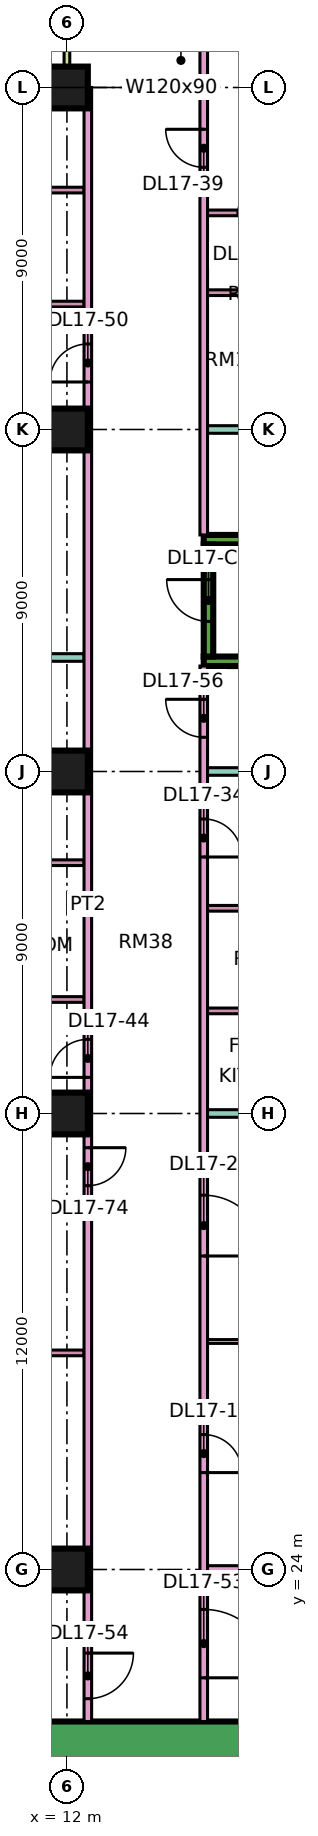
"""IFC4 building model, lengths in metres.
Left out: names, types, materials, properties, quantities, classifications, styles, units other than length and angle.
Written with IfcOpenShell. Run it as: python <this file> out.ifc"""

import sys

from ifc_helpers import new_model, si_unit, direction, frame, frame_2d, origin, origin_2d, place, context, subcontext, project, spatial, rectangle, extrude, element, fill, save


model = new_model("IFC4")
c1 = context("Model", 3, precision=1e-05, world=origin(), true_north=direction((0.0, 1.0)))
c2 = subcontext(c1, "Body", "Model", "MODEL_VIEW")
j1 = project(units=[si_unit("LENGTHUNIT", "METRE"), si_unit("PLANEANGLEUNIT", "RADIAN")], contexts=[c1])
p1 = place(None, origin())
s1 = spatial("IfcSite", under=j1, at=p1, CompositionType="ELEMENT")
p2 = place(p1, origin())
s2 = spatial("IfcBuilding", under=s1, at=p2, CompositionType="ELEMENT")
p3 = place(p2, frame((0.0, 0.0, 78.9)))
s3 = spatial("IfcBuildingStorey", under=s2, at=p3, CompositionType="ELEMENT", Elevation=78.9)
for number, where, z_axis, x_axis in (
    (1, (12.0, 24.0, 0.0), (0.0, 0.0, 1.0), (1.0, 0.0, 0.0)),
    (2, (12.0, 36.0, 0.0), (0.0, 0.0, 1.0), (1.0, 0.0, 0.0)),
    (3, (12.0, 45.0, 0.0), (0.0, 0.0, 1.0), (1.0, 0.0, 0.0)),
    (4, (12.0, 54.0, 0.0), (0.0, 0.0, 1.0), (1.0, 0.0, 0.0)),
    (5, (12.0, 63.0, 0.0), (0.0, 0.0, 1.0), (1.0, 0.0, 0.0)),
):
    element("IfcColumn", number, at=place(p3, frame(where, z_axis=z_axis, x_axis=x_axis)), inside=s3, PredefinedType="COLUMN", context=c2, shape_type="SweptSolid", body=[
        extrude(rectangle(XDim=1.1, YDim=1.1, at=origin_2d()), origin(), (0.0, 0.0, 1.0), 3.75),
    ])
p4 = place(p3, frame((9.0, 19.45, 0.0), z_axis=(0.0, 0.0, 1.0), x_axis=(1.0, 0.0, 0.0)))
e6 = element("IfcWall", 6, at=p4, inside=s3, PredefinedType="SHEAR", context=c2, shape_type="SweptSolid", body=[
    extrude(rectangle(XDim=25.0, YDim=1.1, at=frame_2d((12.5, 0.0))), origin(), (0.0, 0.0, 1.0), 3.75),
])
p5 = place(p4, frame((19.1, 0.0, 0.0)))
e7 = element("IfcOpeningElement", 7, at=p5, cuts=e6, PredefinedType="OPENING", context=c2, shape_type="SweptSolid", body=[
    extrude(rectangle(XDim=1.8, YDim=2.4, at=frame_2d((0.9, 1.2))), frame((0.0, 0.56, 0.0), z_axis=(0.0, -1.0, 0.0), x_axis=(1.0, 0.0, 0.0)), (0.0, 0.0, 1.0), 1.12),
])
for number, where, z_axis, x_axis in (
    (8, (15.6, 47.9, 0.0), (0.0, 0.0, 1.0), (1.0, 0.0, 0.0)),
    (9, (15.6, 51.1, 0.0), (0.0, 0.0, 1.0), (1.0, 0.0, 0.0)),
):
    element("IfcWall", number, at=place(p3, frame(where, z_axis=z_axis, x_axis=x_axis)), inside=s3, PredefinedType="SHEAR", context=c2, shape_type="SweptSolid", body=[
        extrude(rectangle(XDim=7.0, YDim=0.25, at=frame_2d((3.5, 0.0))), origin(), (0.0, 0.0, 1.0), 3.75),
    ])
p6 = place(p3, frame((15.725, 48.025, 0.0), z_axis=(0.0, 0.0, 1.0), x_axis=(0.0, 1.0, 0.0)))
e10 = element("IfcWall", 10, at=p6, inside=s3, PredefinedType="SHEAR", context=c2, shape_type="SweptSolid", body=[
    extrude(rectangle(XDim=2.95, YDim=0.25, at=frame_2d((1.475, 0.0))), origin(), (0.0, 0.0, 1.0), 3.75),
])
p7 = place(p6, frame((0.925, 0.0, 0.0)))
e11 = element("IfcOpeningElement", 11, at=p7, cuts=e10, PredefinedType="OPENING", context=c2, shape_type="SweptSolid", body=[
    extrude(rectangle(XDim=1.1, YDim=2.2, at=frame_2d((0.55, 1.1))), frame((0.0, 0.135, 0.0), z_axis=(0.0, -1.0, 0.0), x_axis=(1.0, 0.0, 0.0)), (0.0, 0.0, 1.0), 0.27),
])
p8 = place(p3, frame((11.925, 63.0, 0.0), z_axis=(0.0, 0.0, 1.0), x_axis=(-1.0, 0.0, 0.0)))
e12 = element("IfcWall", 12, at=p8, inside=s3, PredefinedType="SOLIDWALL", context=c2, shape_type="SweptSolid", body=[
    extrude(rectangle(XDim=10.35, YDim=0.15, at=frame_2d((5.175, 0.0))), origin(), (0.0, 0.0, 1.0), 3.35),
])
p9 = place(p8, frame((1.775, 0.0, 1.7)))
e13 = element("IfcOpeningElement", 13, at=p9, cuts=e12, PredefinedType="OPENING", context=c2, shape_type="SweptSolid", body=[
    extrude(rectangle(XDim=1.2, YDim=0.9, at=frame_2d((0.6, 0.45))), frame((0.0, 0.085, 0.0), z_axis=(0.0, -1.0, 0.0), x_axis=(1.0, 0.0, 0.0)), (0.0, 0.0, 1.0), 0.17),
])
p10 = place(p8, frame((6.962, 0.0, 0.0)))
e14 = element("IfcOpeningElement", 14, at=p10, cuts=e12, PredefinedType="OPENING", context=c2, shape_type="SweptSolid", body=[
    extrude(rectangle(XDim=1.8, YDim=2.4, at=frame_2d((0.9, 1.2))), frame((0.0, 0.085, 0.0), z_axis=(0.0, -1.0, 0.0), x_axis=(1.0, 0.0, 0.0)), (0.0, 0.0, 1.0), 0.17),
])
p11 = place(p3, frame((12.0, 64.5, 0.0), z_axis=(0.0, 0.0, 1.0), x_axis=(0.0, -1.0, 0.0)))
e15 = element("IfcWall", 15, at=p11, inside=s3, PredefinedType="SOLIDWALL", context=c2, shape_type="SweptSolid", body=[
    extrude(rectangle(XDim=1.5, YDim=0.15, at=frame_2d((0.75, 0.0))), origin(), (0.0, 0.0, 1.0), 3.35),
])
p12 = place(p3, frame((-1.35, 22.4, 0.0), z_axis=(0.0, 0.0, 1.0), x_axis=(1.0, 0.0, 0.0)))
e16 = element("IfcWall", 16, at=p12, inside=s3, PredefinedType="PARTITIONING", context=c2, shape_type="SweptSolid", body=[
    extrude(rectangle(XDim=13.8, YDim=0.2, at=frame_2d((6.9, 0.0))), origin(), (0.0, 0.0, 1.0), 3.35),
])
p13 = place(p3, frame((0.0, 36.0, 0.0), z_axis=(0.0, 0.0, 1.0), x_axis=(1.0, 0.0, 0.0)))
e17 = element("IfcWall", 17, at=p13, inside=s3, PredefinedType="PARTITIONING", context=c2, shape_type="SweptSolid", body=[
    extrude(rectangle(XDim=12.45, YDim=0.2, at=frame_2d((6.225, 0.0))), origin(), (0.0, 0.0, 1.0), 3.35),
])
p14 = place(p3, frame((0.0, 48.0, 0.0), z_axis=(0.0, 0.0, 1.0), x_axis=(1.0, 0.0, 0.0)))
e18 = element("IfcWall", 18, at=p14, inside=s3, PredefinedType="PARTITIONING", context=c2, shape_type="SweptSolid", body=[
    extrude(rectangle(XDim=12.45, YDim=0.2, at=frame_2d((6.225, 0.0))), origin(), (0.0, 0.0, 1.0), 3.35),
])
for number, where, z_axis, x_axis in (
    (19, (7.225, 29.7, 0.0), (0.0, 0.0, 1.0), (1.0, 0.0, 0.0)),
    (20, (7.225, 33.3, 0.0), (0.0, 0.0, 1.0), (1.0, 0.0, 0.0)),
):
    element("IfcWall", number, at=place(p3, frame(where, z_axis=z_axis, x_axis=x_axis)), inside=s3, PredefinedType="PARTITIONING", context=c2, shape_type="SweptSolid", body=[
        extrude(rectangle(XDim=5.225, YDim=0.15, at=frame_2d((2.612, 0.0))), origin(), (0.0, 0.0, 1.0), 3.35),
    ])
p15 = place(p3, frame((7.8, 54.3, 0.0), z_axis=(0.0, 0.0, 1.0), x_axis=(1.0, 0.0, 0.0)))
e21 = element("IfcWall", 21, at=p15, inside=s3, PredefinedType="PARTITIONING", context=c2, shape_type="SweptSolid", body=[
    extrude(rectangle(XDim=4.65, YDim=0.1, at=frame_2d((2.325, 0.0))), origin(), (0.0, 0.0, 1.0), 3.35),
])
for number, where, z_axis, x_axis in (
    (22, (7.825, 57.3, 0.0), (0.0, 0.0, 1.0), (1.0, 0.0, 0.0)),
    (23, (7.825, 60.3, 0.0), (0.0, 0.0, 1.0), (1.0, 0.0, 0.0)),
):
    element("IfcWall", number, at=place(p3, frame(where, z_axis=z_axis, x_axis=x_axis)), inside=s3, PredefinedType="PARTITIONING", context=c2, shape_type="SweptSolid", body=[
        extrude(rectangle(XDim=4.625, YDim=0.15, at=frame_2d((2.312, 0.0))), origin(), (0.0, 0.0, 1.0), 3.35),
    ])
p16 = place(p3, frame((8.425, 39.0, 0.0), z_axis=(0.0, 0.0, 1.0), x_axis=(1.0, 0.0, 0.0)))
e24 = element("IfcWall", 24, at=p16, inside=s3, PredefinedType="PARTITIONING", context=c2, shape_type="SweptSolid", body=[
    extrude(rectangle(XDim=4.025, YDim=0.15, at=frame_2d((2.012, 0.0))), origin(), (0.0, 0.0, 1.0), 3.35),
])
p17 = place(p16, frame((1.675, 0.0, 0.0)))
e25 = element("IfcOpeningElement", 25, at=p17, cuts=e24, PredefinedType="OPENING", context=c2, shape_type="SweptSolid", body=[
    extrude(rectangle(XDim=0.8, YDim=2.1, at=frame_2d((0.4, 1.05))), frame((0.0, 0.085, 0.0), z_axis=(0.0, -1.0, 0.0), x_axis=(1.0, 0.0, 0.0)), (0.0, 0.0, 1.0), 0.17),
])
p18 = place(p3, frame((8.425, 42.6, 0.0), z_axis=(0.0, 0.0, 1.0), x_axis=(1.0, 0.0, 0.0)))
e26 = element("IfcWall", 26, at=p18, inside=s3, PredefinedType="PARTITIONING", context=c2, shape_type="SweptSolid", body=[
    extrude(rectangle(XDim=4.025, YDim=0.15, at=frame_2d((2.012, 0.0))), origin(), (0.0, 0.0, 1.0), 3.35),
])
p19 = place(p3, frame((12.55, 20.0, 0.0), z_axis=(0.0, 0.0, 1.0), x_axis=(0.0, 1.0, 0.0)))
e27 = element("IfcWall", 27, at=p19, inside=s3, PredefinedType="PARTITIONING", context=c2, shape_type="SweptSolid", body=[
    extrude(rectangle(XDim=43.0, YDim=0.2, at=frame_2d((21.5, 0.0))), origin(), (0.0, 0.0, 1.0), 3.35),
])
p20 = place(p19, frame((16.95, 0.0, 0.0)))
e28 = element("IfcOpeningElement", 28, at=p20, cuts=e27, PredefinedType="OPENING", context=c2, shape_type="SweptSolid", body=[
    extrude(rectangle(XDim=1.0, YDim=2.1, at=frame_2d((0.5, 1.05))), frame((0.0, 0.11, 0.0), z_axis=(0.0, -1.0, 0.0), x_axis=(1.0, 0.0, 0.0)), (0.0, 0.0, 1.0), 0.22),
])
p21 = place(p19, frame((35.25, 0.0, 0.0)))
e29 = element("IfcOpeningElement", 29, at=p21, cuts=e27, PredefinedType="OPENING", context=c2, shape_type="SweptSolid", body=[
    extrude(rectangle(XDim=1.0, YDim=2.1, at=frame_2d((0.5, 1.05))), frame((0.0, 0.11, 0.0), z_axis=(0.0, -1.0, 0.0), x_axis=(1.0, 0.0, 0.0)), (0.0, 0.0, 1.0), 0.22),
])
p22 = place(p19, frame((0.6, 0.0, 0.0)))
e30 = element("IfcOpeningElement", 30, at=p22, cuts=e27, PredefinedType="OPENING", context=c2, shape_type="SweptSolid", body=[
    extrude(rectangle(XDim=1.2, YDim=2.1, at=frame_2d((0.6, 1.05))), frame((0.0, 0.11, 0.0), z_axis=(0.0, -1.0, 0.0), x_axis=(1.0, 0.0, 0.0)), (0.0, 0.0, 1.0), 0.22),
])
p23 = place(p19, frame((14.1, 0.0, 0.0)))
e31 = element("IfcOpeningElement", 31, at=p23, cuts=e27, PredefinedType="OPENING", context=c2, shape_type="SweptSolid", body=[
    extrude(rectangle(XDim=1.0, YDim=2.1, at=frame_2d((0.5, 1.05))), frame((0.0, 0.11, 0.0), z_axis=(0.0, -1.0, 0.0), x_axis=(1.0, 0.0, 0.0)), (0.0, 0.0, 1.0), 0.22),
])
p24 = place(p3, frame((15.6, 20.0, 0.0), z_axis=(0.0, 0.0, 1.0), x_axis=(0.0, 1.0, 0.0)))
e32 = element("IfcWall", 32, at=p24, inside=s3, PredefinedType="PARTITIONING", context=c2, shape_type="SweptSolid", body=[
    extrude(rectangle(XDim=27.775, YDim=0.2, at=frame_2d((13.887, 0.0))), origin(), (0.0, 0.0, 1.0), 3.35),
])
p25 = place(p24, frame((6.55, 0.0, 0.0)))
e33 = element("IfcOpeningElement", 33, at=p25, cuts=e32, PredefinedType="OPENING", context=c2, shape_type="SweptSolid", body=[
    extrude(rectangle(XDim=1.0, YDim=2.1, at=frame_2d((0.5, 1.05))), frame((0.0, 0.11, 0.0), z_axis=(0.0, -1.0, 0.0), x_axis=(1.0, 0.0, 0.0)), (0.0, 0.0, 1.0), 0.22),
])
p26 = place(p24, frame((12.25, 0.0, 0.0)))
e34 = element("IfcOpeningElement", 34, at=p26, cuts=e32, PredefinedType="OPENING", context=c2, shape_type="SweptSolid", body=[
    extrude(rectangle(XDim=1.6, YDim=2.1, at=frame_2d((0.8, 1.05))), frame((0.0, 0.11, 0.0), z_axis=(0.0, -1.0, 0.0), x_axis=(1.0, 0.0, 0.0)), (0.0, 0.0, 1.0), 0.22),
])
p27 = place(p24, frame((22.75, 0.0, 0.0)))
e35 = element("IfcOpeningElement", 35, at=p27, cuts=e32, PredefinedType="OPENING", context=c2, shape_type="SweptSolid", body=[
    extrude(rectangle(XDim=1.0, YDim=2.1, at=frame_2d((0.5, 1.05))), frame((0.0, 0.11, 0.0), z_axis=(0.0, -1.0, 0.0), x_axis=(1.0, 0.0, 0.0)), (0.0, 0.0, 1.0), 0.22),
])
p28 = place(p24, frame((1.15, 0.0, 0.0)))
e36 = element("IfcOpeningElement", 36, at=p28, cuts=e32, PredefinedType="OPENING", context=c2, shape_type="SweptSolid", body=[
    extrude(rectangle(XDim=1.8, YDim=2.1, at=frame_2d((0.9, 1.05))), frame((0.0, 0.11, 0.0), z_axis=(0.0, -1.0, 0.0), x_axis=(1.0, 0.0, 0.0)), (0.0, 0.0, 1.0), 0.22),
])
p29 = place(p24, frame((25.9, 0.0, 0.0)))
e37 = element("IfcOpeningElement", 37, at=p29, cuts=e32, PredefinedType="OPENING", context=c2, shape_type="SweptSolid", body=[
    extrude(rectangle(XDim=1.0, YDim=2.1, at=frame_2d((0.5, 1.05))), frame((0.0, 0.11, 0.0), z_axis=(0.0, -1.0, 0.0), x_axis=(1.0, 0.0, 0.0)), (0.0, 0.0, 1.0), 0.22),
])
p30 = place(p3, frame((15.6, 51.225, 0.0), z_axis=(0.0, 0.0, 1.0), x_axis=(0.0, 1.0, 0.0)))
e38 = element("IfcWall", 38, at=p30, inside=s3, PredefinedType="PARTITIONING", context=c2, shape_type="SweptSolid", body=[
    extrude(rectangle(XDim=13.125, YDim=0.2, at=frame_2d((6.562, 0.0))), origin(), (0.0, 0.0, 1.0), 3.35),
])
p31 = place(p30, frame((9.675, 0.0, 0.0)))
e39 = element("IfcOpeningElement", 39, at=p31, cuts=e38, PredefinedType="OPENING", context=c2, shape_type="SweptSolid", body=[
    extrude(rectangle(XDim=1.0, YDim=2.1, at=frame_2d((0.5, 1.05))), frame((0.0, 0.11, 0.0), z_axis=(0.0, -1.0, 0.0), x_axis=(1.0, 0.0, 0.0)), (0.0, 0.0, 1.0), 0.22),
])
p32 = place(p3, frame((15.7, 24.0, 0.0), z_axis=(0.0, 0.0, 1.0), x_axis=(1.0, 0.0, 0.0)))
e40 = element("IfcWall", 40, at=p32, inside=s3, PredefinedType="PARTITIONING", context=c2, shape_type="SweptSolid", body=[
    extrude(rectangle(XDim=5.8, YDim=0.2, at=frame_2d((2.9, 0.0))), origin(), (0.0, 0.0, 1.0), 3.35),
])
p33 = place(p3, frame((15.7, 30.0, 0.0), z_axis=(0.0, 0.0, 1.0), x_axis=(1.0, 0.0, 0.0)))
e41 = element("IfcWall", 41, at=p33, inside=s3, PredefinedType="PARTITIONING", context=c2, shape_type="SweptSolid", body=[
    extrude(rectangle(XDim=5.8, YDim=0.1, at=frame_2d((2.9, 0.0))), origin(), (0.0, 0.0, 1.0), 3.35),
])
p34 = place(p3, frame((15.7, 36.0, 0.0), z_axis=(0.0, 0.0, 1.0), x_axis=(1.0, 0.0, 0.0)))
e42 = element("IfcWall", 42, at=p34, inside=s3, PredefinedType="PARTITIONING", context=c2, shape_type="SweptSolid", body=[
    extrude(rectangle(XDim=8.3, YDim=0.2, at=frame_2d((4.15, 0.0))), origin(), (0.0, 0.0, 1.0), 3.35),
])
for number, where, z_axis, x_axis in (
    (43, (15.7, 38.7, 0.0), (0.0, 0.0, 1.0), (1.0, 0.0, 0.0)),
    (44, (15.7, 41.4, 0.0), (0.0, 0.0, 1.0), (1.0, 0.0, 0.0)),
):
    element("IfcWall", number, at=place(p3, frame(where, z_axis=z_axis, x_axis=x_axis)), inside=s3, PredefinedType="PARTITIONING", context=c2, shape_type="SweptSolid", body=[
        extrude(rectangle(XDim=2.825, YDim=0.15, at=frame_2d((1.413, 0.0))), origin(), (0.0, 0.0, 1.0), 3.35),
    ])
p35 = place(p3, frame((15.7, 45.0, 0.0), z_axis=(0.0, 0.0, 1.0), x_axis=(1.0, 0.0, 0.0)))
e45 = element("IfcWall", 45, at=p35, inside=s3, PredefinedType="PARTITIONING", context=c2, shape_type="SweptSolid", body=[
    extrude(rectangle(XDim=8.3, YDim=0.2, at=frame_2d((4.15, 0.0))), origin(), (0.0, 0.0, 1.0), 3.35),
])
p36 = place(p3, frame((15.7, 54.0, 0.0), z_axis=(0.0, 0.0, 1.0), x_axis=(1.0, 0.0, 0.0)))
e46 = element("IfcWall", 46, at=p36, inside=s3, PredefinedType="PARTITIONING", context=c2, shape_type="SweptSolid", body=[
    extrude(rectangle(XDim=8.226, YDim=0.2, at=frame_2d((4.113, 0.0))), origin(), (0.0, 0.0, 1.0), 3.35),
])
p37 = place(p3, frame((15.7, 57.6, 0.0), z_axis=(0.0, 0.0, 1.0), x_axis=(1.0, 0.0, 0.0)))
e47 = element("IfcWall", 47, at=p37, inside=s3, PredefinedType="PARTITIONING", context=c2, shape_type="SweptSolid", body=[
    extrude(rectangle(XDim=2.525, YDim=0.15, at=frame_2d((1.263, 0.0))), origin(), (0.0, 0.0, 1.0), 3.35),
])
p38 = place(p3, frame((15.7, 59.7, 0.0), z_axis=(0.0, 0.0, 1.0), x_axis=(1.0, 0.0, 0.0)))
e48 = element("IfcWall", 48, at=p38, inside=s3, PredefinedType="PARTITIONING", context=c2, shape_type="SweptSolid", body=[
    extrude(rectangle(XDim=2.525, YDim=0.15, at=frame_2d((1.263, 0.0))), origin(), (0.0, 0.0, 1.0), 3.35),
])
p39 = place(p38, frame((0.8, 0.0, 0.0)))
e49 = element("IfcOpeningElement", 49, at=p39, cuts=e48, PredefinedType="OPENING", context=c2, shape_type="SweptSolid", body=[
    extrude(rectangle(XDim=0.8, YDim=2.1, at=frame_2d((0.4, 1.05))), frame((0.0, 0.085, 0.0), z_axis=(0.0, -1.0, 0.0), x_axis=(1.0, 0.0, 0.0)), (0.0, 0.0, 1.0), 0.17),
])
p40 = place(p7, frame((1.1, 0.0, 0.0), z_axis=(0.0, 0.0, 1.0), x_axis=(-1.0, 0.0, 0.0)))
e50 = element("IfcDoor", 50, at=p40, inside=s3, OperationType="SINGLE_SWING_RIGHT", PredefinedType="DOOR", context=c2, shape_type="SweptSolid", body=[
    extrude(rectangle(XDim=1.1, YDim=2.2, at=frame_2d((0.55, 1.1))), frame((0.0, 0.025, 0.0), z_axis=(0.0, -1.0, 0.0), x_axis=(1.0, 0.0, 0.0)), (0.0, 0.0, 1.0), 0.05),
])
fill(e11, e50)
p41 = place(p25, frame((1.0, 0.0, 0.0), z_axis=(0.0, 0.0, 1.0), x_axis=(-1.0, 0.0, 0.0)))
e51 = element("IfcDoor", 51, at=p41, inside=s3, OperationType="SINGLE_SWING_LEFT", PredefinedType="DOOR", context=c2, shape_type="SweptSolid", body=[
    extrude(rectangle(XDim=1.0, YDim=2.1, at=frame_2d((0.5, 1.05))), frame((0.0, 0.025, 0.0), z_axis=(0.0, -1.0, 0.0), x_axis=(1.0, 0.0, 0.0)), (0.0, 0.0, 1.0), 0.05),
])
fill(e33, e51)
p42 = place(p26, frame((1.6, 0.0, 0.0), z_axis=(0.0, 0.0, 1.0), x_axis=(-1.0, 0.0, 0.0)))
e52 = element("IfcDoor", 52, at=p42, inside=s3, OperationType="DOUBLE_DOOR_SINGLE_SWING", PredefinedType="DOOR", context=c2, shape_type="SweptSolid", body=[
    extrude(rectangle(XDim=1.6, YDim=2.1, at=frame_2d((0.8, 1.05))), frame((0.0, 0.025, 0.0), z_axis=(0.0, -1.0, 0.0), x_axis=(1.0, 0.0, 0.0)), (0.0, 0.0, 1.0), 0.05),
])
fill(e34, e52)
p43 = place(p27, frame((1.0, 0.0, 0.0), z_axis=(0.0, 0.0, 1.0), x_axis=(-1.0, 0.0, 0.0)))
e53 = element("IfcDoor", 53, at=p43, inside=s3, OperationType="SINGLE_SWING_LEFT", PredefinedType="DOOR", context=c2, shape_type="SweptSolid", body=[
    extrude(rectangle(XDim=1.0, YDim=2.1, at=frame_2d((0.5, 1.05))), frame((0.0, 0.025, 0.0), z_axis=(0.0, -1.0, 0.0), x_axis=(1.0, 0.0, 0.0)), (0.0, 0.0, 1.0), 0.05),
])
fill(e35, e53)
p44 = place(p39, frame((0.8, 0.0, 0.0), z_axis=(0.0, 0.0, 1.0), x_axis=(-1.0, 0.0, 0.0)))
e54 = element("IfcDoor", 54, at=p44, inside=s3, OperationType="SINGLE_SWING_RIGHT", PredefinedType="DOOR", context=c2, shape_type="SweptSolid", body=[
    extrude(rectangle(XDim=0.8, YDim=2.1, at=frame_2d((0.4, 1.05))), frame((0.0, 0.025, 0.0), z_axis=(0.0, -1.0, 0.0), x_axis=(1.0, 0.0, 0.0)), (0.0, 0.0, 1.0), 0.05),
])
fill(e49, e54)
p45 = place(p31, frame((1.0, 0.0, 0.0), z_axis=(0.0, 0.0, 1.0), x_axis=(-1.0, 0.0, 0.0)))
e55 = element("IfcDoor", 55, at=p45, inside=s3, OperationType="SINGLE_SWING_RIGHT", PredefinedType="DOOR", context=c2, shape_type="SweptSolid", body=[
    extrude(rectangle(XDim=1.0, YDim=2.1, at=frame_2d((0.5, 1.05))), frame((0.0, 0.025, 0.0), z_axis=(0.0, -1.0, 0.0), x_axis=(1.0, 0.0, 0.0)), (0.0, 0.0, 1.0), 0.05),
])
fill(e39, e55)
p46 = place(p20, origin())
e56 = element("IfcDoor", 56, at=p46, inside=s3, OperationType="SINGLE_SWING_LEFT", PredefinedType="DOOR", context=c2, shape_type="SweptSolid", body=[
    extrude(rectangle(XDim=1.0, YDim=2.1, at=frame_2d((0.5, 1.05))), frame((0.0, 0.025, 0.0), z_axis=(0.0, -1.0, 0.0), x_axis=(1.0, 0.0, 0.0)), (0.0, 0.0, 1.0), 0.05),
])
fill(e28, e56)
p47 = place(p21, origin())
e57 = element("IfcDoor", 57, at=p47, inside=s3, OperationType="SINGLE_SWING_LEFT", PredefinedType="DOOR", context=c2, shape_type="SweptSolid", body=[
    extrude(rectangle(XDim=1.0, YDim=2.1, at=frame_2d((0.5, 1.05))), frame((0.0, 0.025, 0.0), z_axis=(0.0, -1.0, 0.0), x_axis=(1.0, 0.0, 0.0)), (0.0, 0.0, 1.0), 0.05),
])
fill(e29, e57)
p48 = place(p28, frame((1.8, 0.0, 0.0), z_axis=(0.0, 0.0, 1.0), x_axis=(-1.0, 0.0, 0.0)))
e58 = element("IfcDoor", 58, at=p48, inside=s3, OperationType="DOUBLE_DOOR_SINGLE_SWING", PredefinedType="DOOR", context=c2, shape_type="SweptSolid", body=[
    extrude(rectangle(XDim=1.8, YDim=2.1, at=frame_2d((0.9, 1.05))), frame((0.0, 0.025, 0.0), z_axis=(0.0, -1.0, 0.0), x_axis=(1.0, 0.0, 0.0)), (0.0, 0.0, 1.0), 0.05),
])
fill(e36, e58)
p49 = place(p22, origin())
e59 = element("IfcDoor", 59, at=p49, inside=s3, OperationType="SINGLE_SWING_RIGHT", PredefinedType="DOOR", context=c2, shape_type="SweptSolid", body=[
    extrude(rectangle(XDim=1.2, YDim=2.1, at=frame_2d((0.6, 1.05))), frame((0.0, 0.025, 0.0), z_axis=(0.0, -1.0, 0.0), x_axis=(1.0, 0.0, 0.0)), (0.0, 0.0, 1.0), 0.05),
])
fill(e30, e59)
p50 = place(p29, frame((1.0, 0.0, 0.0), z_axis=(0.0, 0.0, 1.0), x_axis=(-1.0, 0.0, 0.0)))
e60 = element("IfcDoor", 60, at=p50, inside=s3, OperationType="SINGLE_SWING_RIGHT", PredefinedType="DOOR", context=c2, shape_type="SweptSolid", body=[
    extrude(rectangle(XDim=1.0, YDim=2.1, at=frame_2d((0.5, 1.05))), frame((0.0, 0.025, 0.0), z_axis=(0.0, -1.0, 0.0), x_axis=(1.0, 0.0, 0.0)), (0.0, 0.0, 1.0), 0.05),
])
fill(e37, e60)
p51 = place(p23, origin())
e61 = element("IfcDoor", 61, at=p51, inside=s3, OperationType="SINGLE_SWING_RIGHT", PredefinedType="DOOR", context=c2, shape_type="SweptSolid", body=[
    extrude(rectangle(XDim=1.0, YDim=2.1, at=frame_2d((0.5, 1.05))), frame((0.0, 0.025, 0.0), z_axis=(0.0, -1.0, 0.0), x_axis=(1.0, 0.0, 0.0)), (0.0, 0.0, 1.0), 0.05),
])
fill(e31, e61)
save(model, sys.argv[1])
